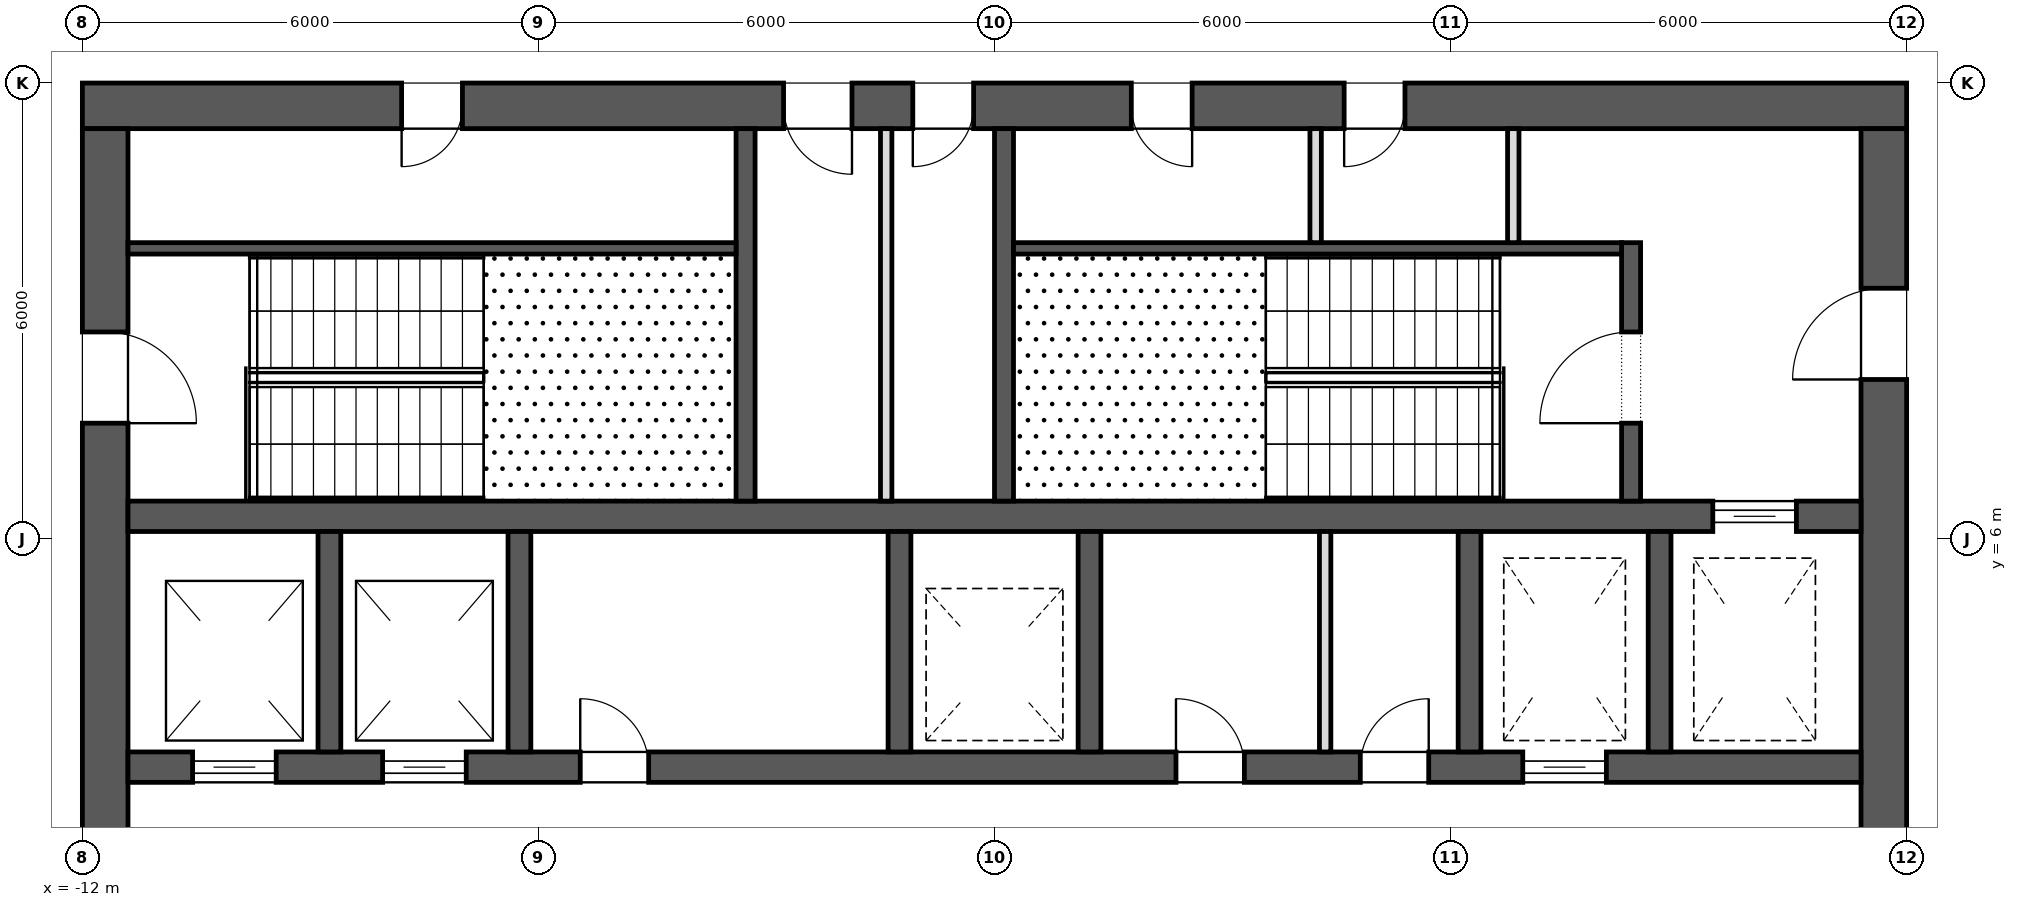
"""IFC4 building model, lengths in metres.
Left out: names, types, materials, properties, quantities, classifications, styles, units other than length and angle.
Written with IfcOpenShell. Run it as: python <this file> out.ifc"""

import sys

from ifc_helpers import new_model, si_unit, direction, frame, frame_2d, origin, place, context, subcontext, project, spatial, rectangle, extrude, element, fill, save


model = new_model("IFC4")
c1 = context("Model", 3, precision=1e-05, world=origin(), true_north=direction((0.0, 1.0)))
c2 = subcontext(c1, "Body", "Model", "MODEL_VIEW")
j1 = project(units=[si_unit("LENGTHUNIT", "METRE"), si_unit("PLANEANGLEUNIT", "RADIAN")], contexts=[c1])
p1 = place(None, origin())
s1 = spatial("IfcSite", under=j1, at=p1, CompositionType="ELEMENT")
p2 = place(p1, origin())
s2 = spatial("IfcBuilding", under=s1, at=p2, CompositionType="ELEMENT")
p3 = place(p2, frame((0.0, 0.0, 312.3)))
s3 = spatial("IfcBuildingStorey", under=s2, at=p3, CompositionType="ELEMENT", Elevation=312.3)
p4 = place(p3, frame((-12.0, 11.7, 0.0), z_axis=(0.0, 0.0, 1.0), x_axis=(1.0, 0.0, 0.0)))
e1 = element("IfcWall", 1, at=p4, inside=s3, PredefinedType="SHEAR", context=c2, shape_type="SweptSolid", body=[
    extrude(rectangle(XDim=24.0, YDim=0.6, at=frame_2d((12.0, 0.0))), origin(), (0.0, 0.0, 1.0), 4.0),
])
p5 = place(p4, frame((9.225, 0.0, 0.0)))
e2 = element("IfcOpeningElement", 2, at=p5, cuts=e1, PredefinedType="OPENING", context=c2, shape_type="SweptSolid", body=[
    extrude(rectangle(XDim=0.9, YDim=2.1, at=frame_2d((0.45, 1.05))), frame((0.0, 0.312, 0.0), z_axis=(0.0, -1.0, 0.0), x_axis=(1.0, 0.0, 0.0)), (0.0, 0.0, 1.0), 0.624),
])
p6 = place(p4, frame((10.925, 0.0, 0.0)))
e3 = element("IfcOpeningElement", 3, at=p6, cuts=e1, PredefinedType="OPENING", context=c2, shape_type="SweptSolid", body=[
    extrude(rectangle(XDim=0.8, YDim=2.1, at=frame_2d((0.4, 1.05))), frame((0.0, 0.312, 0.0), z_axis=(0.0, -1.0, 0.0), x_axis=(1.0, 0.0, 0.0)), (0.0, 0.0, 1.0), 0.624),
])
p7 = place(p4, frame((4.2, 0.0, 0.0)))
e4 = element("IfcOpeningElement", 4, at=p7, cuts=e1, PredefinedType="OPENING", context=c2, shape_type="SweptSolid", body=[
    extrude(rectangle(XDim=0.8, YDim=2.1, at=frame_2d((0.4, 1.05))), frame((0.0, 0.312, 0.0), z_axis=(0.0, -1.0, 0.0), x_axis=(1.0, 0.0, 0.0)), (0.0, 0.0, 1.0), 0.624),
])
p8 = place(p4, frame((13.8, 0.0, 0.0)))
e5 = element("IfcOpeningElement", 5, at=p8, cuts=e1, PredefinedType="OPENING", context=c2, shape_type="SweptSolid", body=[
    extrude(rectangle(XDim=0.8, YDim=2.1, at=frame_2d((0.4, 1.05))), frame((0.0, 0.312, 0.0), z_axis=(0.0, -1.0, 0.0), x_axis=(1.0, 0.0, 0.0)), (0.0, 0.0, 1.0), 0.624),
])
p9 = place(p4, frame((16.6, 0.0, 0.0)))
e6 = element("IfcOpeningElement", 6, at=p9, cuts=e1, PredefinedType="OPENING", context=c2, shape_type="SweptSolid", body=[
    extrude(rectangle(XDim=0.8, YDim=2.1, at=frame_2d((0.4, 1.05))), frame((0.0, 0.312, 0.0), z_axis=(0.0, -1.0, 0.0), x_axis=(1.0, 0.0, 0.0)), (0.0, 0.0, 1.0), 0.624),
])
p10 = place(p3, frame((11.7, -11.4, 0.0), z_axis=(0.0, 0.0, 1.0), x_axis=(0.0, 1.0, 0.0)))
e7 = element("IfcWall", 7, at=p10, inside=s3, PredefinedType="SHEAR", context=c2, shape_type="SweptSolid", body=[
    extrude(rectangle(XDim=22.8, YDim=0.6, at=frame_2d((11.4, 0.0))), origin(), (0.0, 0.0, 1.0), 4.0),
])
p11 = place(p10, frame((10.2, 0.0, 0.0)))
e8 = element("IfcOpeningElement", 8, at=p11, cuts=e7, PredefinedType="OPENING", context=c2, shape_type="SweptSolid", body=[
    extrude(rectangle(XDim=2.4, YDim=2.1, at=frame_2d((1.2, 1.05))), frame((0.0, 0.312, 0.0), z_axis=(0.0, -1.0, 0.0), x_axis=(1.0, 0.0, 0.0)), (0.0, 0.0, 1.0), 0.624),
])
p12 = place(p10, frame((19.5, 0.0, 0.0)))
e9 = element("IfcOpeningElement", 9, at=p12, cuts=e7, PredefinedType="OPENING", context=c2, shape_type="SweptSolid", body=[
    extrude(rectangle(XDim=1.2, YDim=2.1, at=frame_2d((0.6, 1.05))), frame((0.0, 0.312, 0.0), z_axis=(0.0, -1.0, 0.0), x_axis=(1.0, 0.0, 0.0)), (0.0, 0.0, 1.0), 0.624),
])
p13 = place(p10, frame((2.1, 0.0, 0.0)))
e10 = element("IfcOpeningElement", 10, at=p13, cuts=e7, PredefinedType="OPENING", context=c2, shape_type="SweptSolid", body=[
    extrude(rectangle(XDim=1.2, YDim=2.1, at=frame_2d((0.6, 1.05))), frame((0.0, 0.312, 0.0), z_axis=(0.0, -1.0, 0.0), x_axis=(1.0, 0.0, 0.0)), (0.0, 0.0, 1.0), 0.624),
])
p14 = place(p3, frame((-11.7, -11.4, 0.0), z_axis=(0.0, 0.0, 1.0), x_axis=(0.0, 1.0, 0.0)))
e11 = element("IfcWall", 11, at=p14, inside=s3, PredefinedType="SHEAR", context=c2, shape_type="SweptSolid", body=[
    extrude(rectangle(XDim=22.8, YDim=0.6, at=frame_2d((11.4, 0.0))), origin(), (0.0, 0.0, 1.0), 4.0),
])
p15 = place(p14, frame((10.2, 0.0, 0.0)))
e12 = element("IfcOpeningElement", 12, at=p15, cuts=e11, PredefinedType="OPENING", context=c2, shape_type="SweptSolid", body=[
    extrude(rectangle(XDim=2.4, YDim=2.1, at=frame_2d((1.2, 1.05))), frame((0.0, 0.312, 0.0), z_axis=(0.0, -1.0, 0.0), x_axis=(1.0, 0.0, 0.0)), (0.0, 0.0, 1.0), 0.624),
])
p16 = place(p14, frame((18.925, 0.0, 0.0)))
e13 = element("IfcOpeningElement", 13, at=p16, cuts=e11, PredefinedType="OPENING", context=c2, shape_type="SweptSolid", body=[
    extrude(rectangle(XDim=1.2, YDim=2.1, at=frame_2d((0.6, 1.05))), frame((0.0, 0.312, 0.0), z_axis=(0.0, -1.0, 0.0), x_axis=(1.0, 0.0, 0.0)), (0.0, 0.0, 1.0), 0.624),
])
p17 = place(p14, frame((2.675, 0.0, 0.0)))
e14 = element("IfcOpeningElement", 14, at=p17, cuts=e11, PredefinedType="OPENING", context=c2, shape_type="SweptSolid", body=[
    extrude(rectangle(XDim=1.2, YDim=2.1, at=frame_2d((0.6, 1.05))), frame((0.0, 0.312, 0.0), z_axis=(0.0, -1.0, 0.0), x_axis=(1.0, 0.0, 0.0)), (0.0, 0.0, 1.0), 0.624),
])
p18 = place(p3, frame((-11.4, 3.0, 0.0), z_axis=(0.0, 0.0, 1.0), x_axis=(1.0, 0.0, 0.0)))
e15 = element("IfcWall", 15, at=p18, inside=s3, PredefinedType="SHEAR", context=c2, shape_type="SweptSolid", body=[
    extrude(rectangle(XDim=22.8, YDim=0.4, at=frame_2d((11.4, 0.0))), origin(), (0.0, 0.0, 1.0), 4.0),
])
p19 = place(p18, frame((0.85, 0.0, 0.0)))
e16 = element("IfcOpeningElement", 16, at=p19, cuts=e15, PredefinedType="OPENING", context=c2, shape_type="SweptSolid", body=[
    extrude(rectangle(XDim=1.1, YDim=2.1, at=frame_2d((0.55, 1.05))), frame((0.0, 0.212, 0.0), z_axis=(0.0, -1.0, 0.0), x_axis=(1.0, 0.0, 0.0)), (0.0, 0.0, 1.0), 0.424),
])
p20 = place(p18, frame((3.35, 0.0, 0.0)))
e17 = element("IfcOpeningElement", 17, at=p20, cuts=e15, PredefinedType="OPENING", context=c2, shape_type="SweptSolid", body=[
    extrude(rectangle(XDim=1.1, YDim=2.1, at=frame_2d((0.55, 1.05))), frame((0.0, 0.212, 0.0), z_axis=(0.0, -1.0, 0.0), x_axis=(1.0, 0.0, 0.0)), (0.0, 0.0, 1.0), 0.424),
])
p21 = place(p18, frame((18.35, 0.0, 0.0)))
e18 = element("IfcOpeningElement", 18, at=p21, cuts=e15, PredefinedType="OPENING", context=c2, shape_type="SweptSolid", body=[
    extrude(rectangle(XDim=1.1, YDim=2.1, at=frame_2d((0.55, 1.05))), frame((0.0, 0.212, 0.0), z_axis=(0.0, -1.0, 0.0), x_axis=(1.0, 0.0, 0.0)), (0.0, 0.0, 1.0), 0.424),
])
p22 = place(p18, frame((13.788, 0.0, 0.0)))
e19 = element("IfcOpeningElement", 19, at=p22, cuts=e15, PredefinedType="OPENING", context=c2, shape_type="SweptSolid", body=[
    extrude(rectangle(XDim=0.9, YDim=2.1, at=frame_2d((0.45, 1.05))), frame((0.0, 0.212, 0.0), z_axis=(0.0, -1.0, 0.0), x_axis=(1.0, 0.0, 0.0)), (0.0, 0.0, 1.0), 0.424),
])
p23 = place(p18, frame((16.212, 0.0, 0.0)))
e20 = element("IfcOpeningElement", 20, at=p23, cuts=e15, PredefinedType="OPENING", context=c2, shape_type="SweptSolid", body=[
    extrude(rectangle(XDim=0.9, YDim=2.1, at=frame_2d((0.45, 1.05))), frame((0.0, 0.212, 0.0), z_axis=(0.0, -1.0, 0.0), x_axis=(1.0, 0.0, 0.0)), (0.0, 0.0, 1.0), 0.424),
])
p24 = place(p18, frame((5.95, 0.0, 0.0)))
e21 = element("IfcOpeningElement", 21, at=p24, cuts=e15, PredefinedType="OPENING", context=c2, shape_type="SweptSolid", body=[
    extrude(rectangle(XDim=0.9, YDim=2.1, at=frame_2d((0.45, 1.05))), frame((0.0, 0.212, 0.0), z_axis=(0.0, -1.0, 0.0), x_axis=(1.0, 0.0, 0.0)), (0.0, 0.0, 1.0), 0.424),
])
p25 = place(p3, frame((-11.4, 6.3, 0.0), z_axis=(0.0, 0.0, 1.0), x_axis=(1.0, 0.0, 0.0)))
e22 = element("IfcWall", 22, at=p25, inside=s3, PredefinedType="SHEAR", context=c2, shape_type="SweptSolid", body=[
    extrude(rectangle(XDim=22.8, YDim=0.4, at=frame_2d((11.4, 0.0))), origin(), (0.0, 0.0, 1.0), 4.0),
])
p26 = place(p25, frame((20.85, 0.0, 0.0)))
e23 = element("IfcOpeningElement", 23, at=p26, cuts=e22, PredefinedType="OPENING", context=c2, shape_type="SweptSolid", body=[
    extrude(rectangle(XDim=1.1, YDim=2.1, at=frame_2d((0.55, 1.05))), frame((0.0, 0.212, 0.0), z_axis=(0.0, -1.0, 0.0), x_axis=(1.0, 0.0, 0.0)), (0.0, 0.0, 1.0), 0.424),
])
for number, where, z_axis, x_axis in (
    (24, (-8.75, 3.2, 0.0), (0.0, 0.0, 1.0), (0.0, 1.0, 0.0)),
    (25, (-6.25, 3.2, 0.0), (0.0, 0.0, 1.0), (0.0, 1.0, 0.0)),
    (26, (-1.25, 3.2, 0.0), (0.0, 0.0, 1.0), (0.0, 1.0, 0.0)),
    (27, (1.25, 3.2, 0.0), (0.0, 0.0, 1.0), (0.0, 1.0, 0.0)),
    (28, (6.25, 3.2, 0.0), (0.0, 0.0, 1.0), (0.0, 1.0, 0.0)),
    (29, (8.75, 3.2, 0.0), (0.0, 0.0, 1.0), (0.0, 1.0, 0.0)),
):
    element("IfcWall", number, at=place(p3, frame(where, z_axis=z_axis, x_axis=x_axis)), inside=s3, PredefinedType="SHEAR", context=c2, shape_type="SweptSolid", body=[
        extrude(rectangle(XDim=2.9, YDim=0.3, at=frame_2d((1.45, 0.0))), origin(), (0.0, 0.0, 1.0), 4.0),
    ])
for number, where, z_axis, x_axis in (
    (30, (-3.275, 6.5, 0.0), (0.0, 0.0, 1.0), (0.0, 1.0, 0.0)),
    (31, (0.125, 6.5, 0.0), (0.0, 0.0, 1.0), (0.0, 1.0, 0.0)),
):
    element("IfcWall", number, at=place(p3, frame(where, z_axis=z_axis, x_axis=x_axis)), inside=s3, PredefinedType="SHEAR", context=c2, shape_type="SweptSolid", body=[
        extrude(rectangle(XDim=4.9, YDim=0.25, at=frame_2d((2.45, 0.0))), origin(), (0.0, 0.0, 1.0), 3.7),
    ])
p27 = place(p3, frame((8.375, 6.5, 0.0), z_axis=(0.0, 0.0, 1.0), x_axis=(0.0, 1.0, 0.0)))
e32 = element("IfcWall", 32, at=p27, inside=s3, PredefinedType="SHEAR", context=c2, shape_type="SweptSolid", body=[
    extrude(rectangle(XDim=3.4, YDim=0.25, at=frame_2d((1.7, 0.0))), origin(), (0.0, 0.0, 1.0), 3.7),
])
p28 = place(p27, frame((1.025, 0.0, 0.0)))
e33 = element("IfcOpeningElement", 33, at=p28, cuts=e32, PredefinedType="OPENING", context=c2, shape_type="SweptSolid", body=[
    extrude(rectangle(XDim=1.2, YDim=2.1, at=frame_2d((0.6, 1.05))), frame((0.0, 0.137, 0.0), z_axis=(0.0, -1.0, 0.0), x_axis=(1.0, 0.0, 0.0)), (0.0, 0.0, 1.0), 0.274),
])
for number, where, z_axis, x_axis in (
    (34, (-11.4, 9.825, 0.0), (0.0, 0.0, 1.0), (1.0, 0.0, 0.0)),
    (35, (0.25, 9.825, 0.0), (0.0, 0.0, 1.0), (1.0, 0.0, 0.0)),
):
    element("IfcWall", number, at=place(p3, frame(where, z_axis=z_axis, x_axis=x_axis)), inside=s3, PredefinedType="SHEAR", context=c2, shape_type="SweptSolid", body=[
        extrude(rectangle(XDim=8.0, YDim=0.15, at=frame_2d((4.0, 0.0))), origin(), (0.0, 0.0, 1.0), 3.7),
    ])
p29 = place(p3, frame((-1.425, 6.5, 0.0), z_axis=(0.0, 0.0, 1.0), x_axis=(0.0, 1.0, 0.0)))
e36 = element("IfcWall", 36, at=p29, inside=s3, PredefinedType="PARTITIONING", context=c2, shape_type="SweptSolid", body=[
    extrude(rectangle(XDim=4.9, YDim=0.15, at=frame_2d((2.45, 0.0))), origin(), (0.0, 0.0, 1.0), 3.7),
])
for number, where, z_axis, x_axis in (
    (37, (4.225, 9.9, 0.0), (0.0, 0.0, 1.0), (0.0, 1.0, 0.0)),
    (38, (6.825, 9.9, 0.0), (0.0, 0.0, 1.0), (0.0, 1.0, 0.0)),
):
    element("IfcWall", number, at=place(p3, frame(where, z_axis=z_axis, x_axis=x_axis)), inside=s3, PredefinedType="PARTITIONING", context=c2, shape_type="SweptSolid", body=[
        extrude(rectangle(XDim=1.5, YDim=0.15, at=frame_2d((0.75, 0.0))), origin(), (0.0, 0.0, 1.0), 3.7),
    ])
p30 = place(p3, frame((4.35, 3.2, 0.0), z_axis=(0.0, 0.0, 1.0), x_axis=(0.0, 1.0, 0.0)))
e39 = element("IfcWall", 39, at=p30, inside=s3, PredefinedType="PARTITIONING", context=c2, shape_type="SweptSolid", body=[
    extrude(rectangle(XDim=2.9, YDim=0.15, at=frame_2d((1.45, 0.0))), origin(), (0.0, 0.0, 1.0), 3.7),
])
p31 = place(p26, origin())
e40 = element("IfcDoor", 40, at=p31, inside=s3, OperationType="SLIDING_TO_LEFT", PredefinedType="DOOR", context=c2, shape_type="SweptSolid", body=[
    extrude(rectangle(XDim=1.1, YDim=2.1, at=frame_2d((0.55, 1.05))), frame((0.0, 0.025, 0.0), z_axis=(0.0, -1.0, 0.0), x_axis=(1.0, 0.0, 0.0)), (0.0, 0.0, 1.0), 0.05),
])
fill(e23, e40)
p32 = place(p19, origin())
e41 = element("IfcDoor", 41, at=p32, inside=s3, OperationType="SLIDING_TO_LEFT", PredefinedType="DOOR", context=c2, shape_type="SweptSolid", body=[
    extrude(rectangle(XDim=1.1, YDim=2.1, at=frame_2d((0.55, 1.05))), frame((0.0, 0.025, 0.0), z_axis=(0.0, -1.0, 0.0), x_axis=(1.0, 0.0, 0.0)), (0.0, 0.0, 1.0), 0.05),
])
fill(e16, e41)
p33 = place(p20, origin())
e42 = element("IfcDoor", 42, at=p33, inside=s3, OperationType="SLIDING_TO_LEFT", PredefinedType="DOOR", context=c2, shape_type="SweptSolid", body=[
    extrude(rectangle(XDim=1.1, YDim=2.1, at=frame_2d((0.55, 1.05))), frame((0.0, 0.025, 0.0), z_axis=(0.0, -1.0, 0.0), x_axis=(1.0, 0.0, 0.0)), (0.0, 0.0, 1.0), 0.05),
])
fill(e17, e42)
p34 = place(p21, origin())
e43 = element("IfcDoor", 43, at=p34, inside=s3, OperationType="SLIDING_TO_LEFT", PredefinedType="DOOR", context=c2, shape_type="SweptSolid", body=[
    extrude(rectangle(XDim=1.1, YDim=2.1, at=frame_2d((0.55, 1.05))), frame((0.0, 0.025, 0.0), z_axis=(0.0, -1.0, 0.0), x_axis=(1.0, 0.0, 0.0)), (0.0, 0.0, 1.0), 0.05),
])
fill(e18, e43)
p35 = place(p16, frame((1.2, 0.0, 0.0), z_axis=(0.0, 0.0, 1.0), x_axis=(-1.0, 0.0, 0.0)))
e44 = element("IfcDoor", 44, at=p35, inside=s3, OperationType="SINGLE_SWING_LEFT", PredefinedType="DOOR", context=c2, shape_type="SweptSolid", body=[
    extrude(rectangle(XDim=1.2, YDim=2.1, at=frame_2d((0.6, 1.05))), frame((0.0, 0.025, 0.0), z_axis=(0.0, -1.0, 0.0), x_axis=(1.0, 0.0, 0.0)), (0.0, 0.0, 1.0), 0.05),
])
fill(e13, e44)
p36 = place(p28, origin())
e45 = element("IfcDoor", 45, at=p36, inside=s3, OperationType="SINGLE_SWING_RIGHT", PredefinedType="DOOR", context=c2, shape_type="SweptSolid", body=[
    extrude(rectangle(XDim=1.2, YDim=2.1, at=frame_2d((0.6, 1.05))), frame((0.0, 0.025, 0.0), z_axis=(0.0, -1.0, 0.0), x_axis=(1.0, 0.0, 0.0)), (0.0, 0.0, 1.0), 0.05),
])
fill(e33, e45)
p37 = place(p12, origin())
e46 = element("IfcDoor", 46, at=p37, inside=s3, OperationType="SINGLE_SWING_RIGHT", PredefinedType="DOOR", context=c2, shape_type="SweptSolid", body=[
    extrude(rectangle(XDim=1.2, YDim=2.1, at=frame_2d((0.6, 1.05))), frame((0.0, 0.025, 0.0), z_axis=(0.0, -1.0, 0.0), x_axis=(1.0, 0.0, 0.0)), (0.0, 0.0, 1.0), 0.05),
])
fill(e9, e46)
p38 = place(p5, frame((0.9, 0.0, 0.0), z_axis=(0.0, 0.0, 1.0), x_axis=(-1.0, 0.0, 0.0)))
e47 = element("IfcDoor", 47, at=p38, inside=s3, OperationType="SINGLE_SWING_RIGHT", PredefinedType="DOOR", context=c2, shape_type="SweptSolid", body=[
    extrude(rectangle(XDim=0.9, YDim=2.1, at=frame_2d((0.45, 1.05))), frame((0.0, 0.025, 0.0), z_axis=(0.0, -1.0, 0.0), x_axis=(1.0, 0.0, 0.0)), (0.0, 0.0, 1.0), 0.05),
])
fill(e2, e47)
p39 = place(p6, frame((0.8, 0.0, 0.0), z_axis=(0.0, 0.0, 1.0), x_axis=(-1.0, 0.0, 0.0)))
e48 = element("IfcDoor", 48, at=p39, inside=s3, OperationType="SINGLE_SWING_LEFT", PredefinedType="DOOR", context=c2, shape_type="SweptSolid", body=[
    extrude(rectangle(XDim=0.8, YDim=2.1, at=frame_2d((0.4, 1.05))), frame((0.0, 0.025, 0.0), z_axis=(0.0, -1.0, 0.0), x_axis=(1.0, 0.0, 0.0)), (0.0, 0.0, 1.0), 0.05),
])
fill(e3, e48)
p40 = place(p7, frame((0.8, 0.0, 0.0), z_axis=(0.0, 0.0, 1.0), x_axis=(-1.0, 0.0, 0.0)))
e49 = element("IfcDoor", 49, at=p40, inside=s3, OperationType="SINGLE_SWING_LEFT", PredefinedType="DOOR", context=c2, shape_type="SweptSolid", body=[
    extrude(rectangle(XDim=0.8, YDim=2.1, at=frame_2d((0.4, 1.05))), frame((0.0, 0.025, 0.0), z_axis=(0.0, -1.0, 0.0), x_axis=(1.0, 0.0, 0.0)), (0.0, 0.0, 1.0), 0.05),
])
fill(e4, e49)
p41 = place(p8, frame((0.8, 0.0, 0.0), z_axis=(0.0, 0.0, 1.0), x_axis=(-1.0, 0.0, 0.0)))
e50 = element("IfcDoor", 50, at=p41, inside=s3, OperationType="SINGLE_SWING_RIGHT", PredefinedType="DOOR", context=c2, shape_type="SweptSolid", body=[
    extrude(rectangle(XDim=0.8, YDim=2.1, at=frame_2d((0.4, 1.05))), frame((0.0, 0.025, 0.0), z_axis=(0.0, -1.0, 0.0), x_axis=(1.0, 0.0, 0.0)), (0.0, 0.0, 1.0), 0.05),
])
fill(e5, e50)
p42 = place(p9, frame((0.8, 0.0, 0.0), z_axis=(0.0, 0.0, 1.0), x_axis=(-1.0, 0.0, 0.0)))
e51 = element("IfcDoor", 51, at=p42, inside=s3, OperationType="SINGLE_SWING_LEFT", PredefinedType="DOOR", context=c2, shape_type="SweptSolid", body=[
    extrude(rectangle(XDim=0.8, YDim=2.1, at=frame_2d((0.4, 1.05))), frame((0.0, 0.025, 0.0), z_axis=(0.0, -1.0, 0.0), x_axis=(1.0, 0.0, 0.0)), (0.0, 0.0, 1.0), 0.05),
])
fill(e6, e51)
p43 = place(p22, origin())
e52 = element("IfcDoor", 52, at=p43, inside=s3, OperationType="SINGLE_SWING_RIGHT", PredefinedType="DOOR", context=c2, shape_type="SweptSolid", body=[
    extrude(rectangle(XDim=0.9, YDim=2.1, at=frame_2d((0.45, 1.05))), frame((0.0, 0.025, 0.0), z_axis=(0.0, -1.0, 0.0), x_axis=(1.0, 0.0, 0.0)), (0.0, 0.0, 1.0), 0.05),
])
fill(e19, e52)
p44 = place(p23, origin())
e53 = element("IfcDoor", 53, at=p44, inside=s3, OperationType="SINGLE_SWING_LEFT", PredefinedType="DOOR", context=c2, shape_type="SweptSolid", body=[
    extrude(rectangle(XDim=0.9, YDim=2.1, at=frame_2d((0.45, 1.05))), frame((0.0, 0.025, 0.0), z_axis=(0.0, -1.0, 0.0), x_axis=(1.0, 0.0, 0.0)), (0.0, 0.0, 1.0), 0.05),
])
fill(e20, e53)
p45 = place(p24, origin())
e54 = element("IfcDoor", 54, at=p45, inside=s3, OperationType="SINGLE_SWING_RIGHT", PredefinedType="DOOR", context=c2, shape_type="SweptSolid", body=[
    extrude(rectangle(XDim=0.9, YDim=2.1, at=frame_2d((0.45, 1.05))), frame((0.0, 0.025, 0.0), z_axis=(0.0, -1.0, 0.0), x_axis=(1.0, 0.0, 0.0)), (0.0, 0.0, 1.0), 0.05),
])
fill(e21, e54)
save(model, sys.argv[1])
